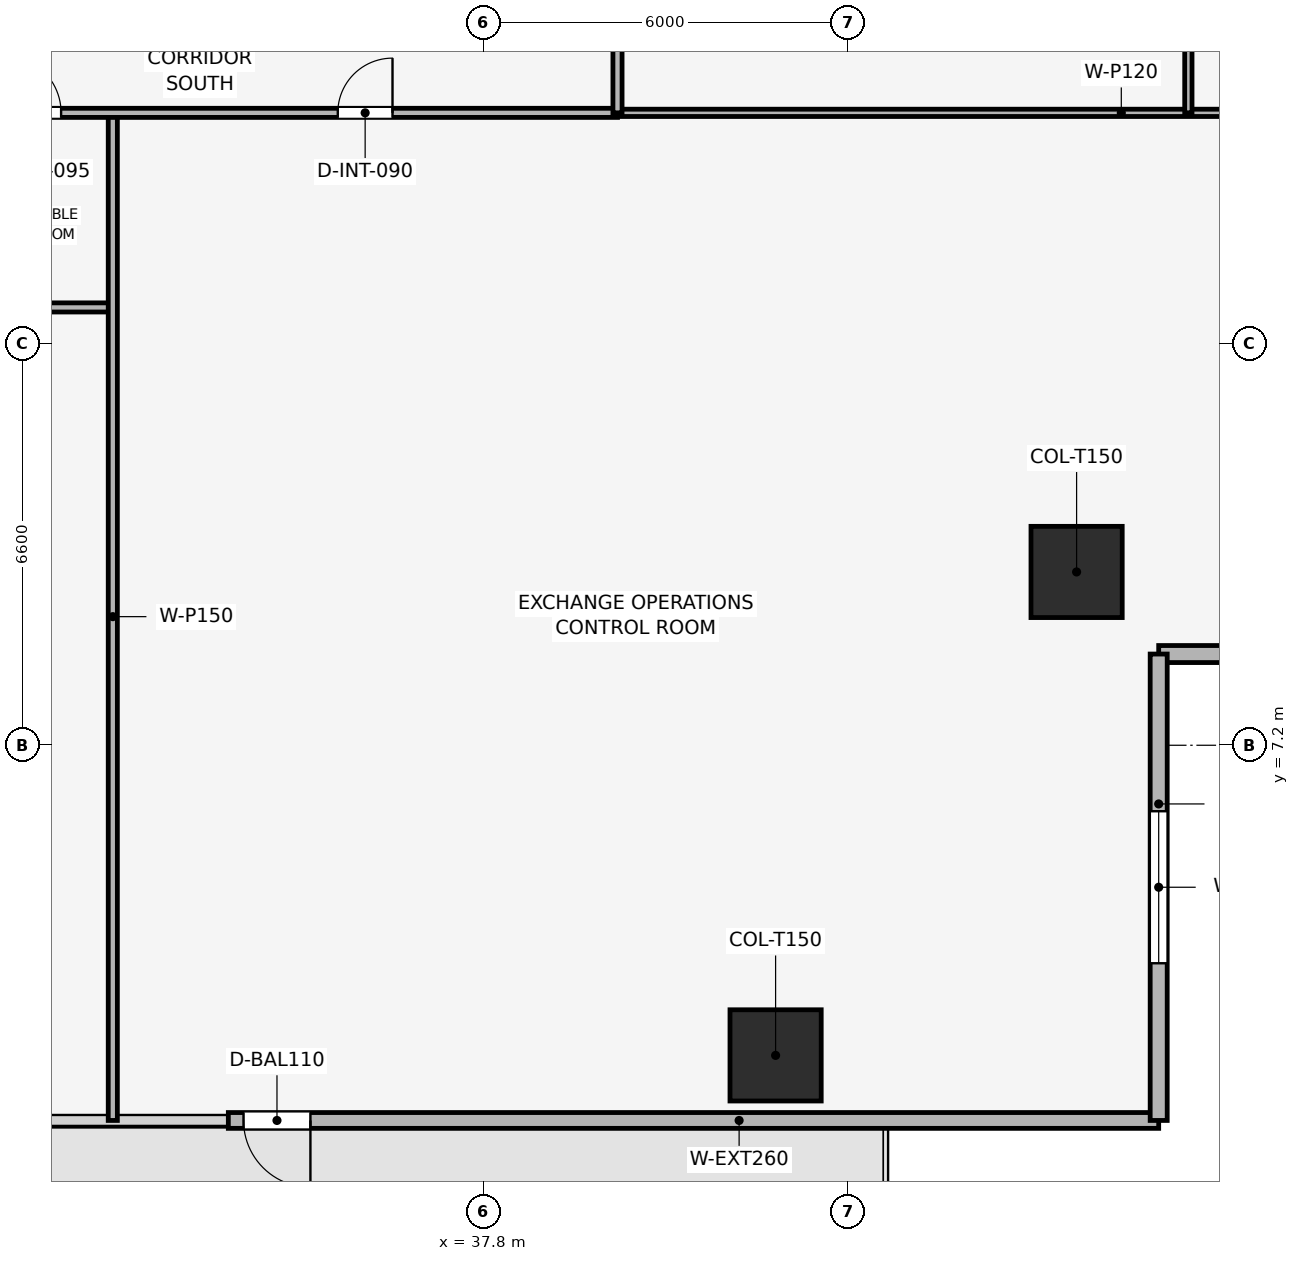
"""IFC4 building model, lengths in metres.
Left out: names, types, materials, properties, quantities, classifications, styles, units other than length and angle.
Written with IfcOpenShell. Run it as: python <this file> out.ifc"""

import sys

from ifc_helpers import new_model, si_unit, direction, frame, frame_2d, origin, origin_2d, place, context, subcontext, project, spatial, rectangle, extrude, element, fill, save


model = new_model("IFC4")
c1 = context("Model", 3, precision=1e-05, world=origin(), true_north=direction((0.0, 1.0)))
c2 = subcontext(c1, "Body", "Model", "MODEL_VIEW")
j1 = project(units=[si_unit("LENGTHUNIT", "METRE"), si_unit("PLANEANGLEUNIT", "RADIAN")], contexts=[c1])
p1 = place(None, origin())
s1 = spatial("IfcSite", under=j1, at=p1, CompositionType="ELEMENT")
p2 = place(p1, origin())
s2 = spatial("IfcBuilding", under=s1, at=p2, CompositionType="ELEMENT")
p3 = place(p2, frame((0.0, 0.0, 80.7)))
s3 = spatial("IfcBuildingStorey", under=s2, at=p3, CompositionType="ELEMENT", Elevation=80.7)
for number, where, z_axis, x_axis in (
    (1, (42.6, 2.1, 0.003), (0.0, 0.0, 1.0), (1.0, 0.0, 0.0)),
    (2, (47.55, 10.05, 0.003), (0.0, 0.0, 1.0), (1.0, 0.0, 0.0)),
):
    element("IfcColumn", number, at=place(p3, frame(where, z_axis=z_axis, x_axis=x_axis)), inside=s3, PredefinedType="COLUMN", context=c2, shape_type="SweptSolid", body=[
        extrude(rectangle(XDim=1.5, YDim=1.5, at=origin_2d()), origin(), (0.0, 0.0, 1.0), 3.644),
    ])
p4 = place(p3, frame((48.9, 1.03, 0.0), z_axis=(0.0, 0.0, 1.0), x_axis=(-1.0, 0.0, 0.0)))
e3 = element("IfcWall", 3, at=p4, inside=s3, PredefinedType="SOLIDWALL", context=c2, shape_type="SweptSolid", body=[
    extrude(rectangle(XDim=15.3, YDim=0.26, at=frame_2d((7.65, 0.0))), origin(), (0.0, 0.0, 1.0), 3.65),
])
p5 = place(p4, frame((13.95, 0.0, 0.0)))
e4 = element("IfcOpeningElement", 4, at=p5, cuts=e3, PredefinedType="OPENING", context=c2, shape_type="SweptSolid", body=[
    extrude(rectangle(XDim=1.1, YDim=2.2, at=frame_2d((0.55, 1.1))), frame((0.0, 0.14, 0.0), z_axis=(0.0, -1.0, 0.0), x_axis=(1.0, 0.0, 0.0)), (0.0, 0.0, 1.0), 0.28),
])
p6 = place(p3, frame((56.57, 8.7, 0.0), z_axis=(0.0, 0.0, 1.0), x_axis=(-1.0, 0.0, 0.0)))
e5 = element("IfcWall", 5, at=p6, inside=s3, PredefinedType="SOLIDWALL", context=c2, shape_type="SweptSolid", body=[
    extrude(rectangle(XDim=7.67, YDim=0.28, at=frame_2d((3.835, 0.0))), origin(), (0.0, 0.0, 1.0), 3.65),
])
p7 = place(p6, frame((2.585, 0.0, 0.9)))
e6 = element("IfcOpeningElement", 6, at=p7, cuts=e5, PredefinedType="OPENING", context=c2, shape_type="SweptSolid", body=[
    extrude(rectangle(XDim=2.5, YDim=1.9, at=frame_2d((1.25, 0.95))), frame((0.0, 0.15, 0.0), z_axis=(0.0, -1.0, 0.0), x_axis=(1.0, 0.0, 0.0)), (0.0, 0.0, 1.0), 0.3),
])
p8 = place(p3, frame((48.9, 8.7, 0.0), z_axis=(0.0, 0.0, 1.0), x_axis=(0.0, -1.0, 0.0)))
e7 = element("IfcWall", 7, at=p8, inside=s3, PredefinedType="SOLIDWALL", context=c2, shape_type="SweptSolid", body=[
    extrude(rectangle(XDim=7.67, YDim=0.28, at=frame_2d((3.835, 0.0))), origin(), (0.0, 0.0, 1.0), 3.65),
])
p9 = place(p8, frame((2.585, 0.0, 0.9)))
e8 = element("IfcOpeningElement", 8, at=p9, cuts=e7, PredefinedType="OPENING", context=c2, shape_type="SweptSolid", body=[
    extrude(rectangle(XDim=2.5, YDim=1.9, at=frame_2d((1.25, 0.95))), frame((0.0, 0.15, 0.0), z_axis=(0.0, -1.0, 0.0), x_axis=(1.0, 0.0, 0.0)), (0.0, 0.0, 1.0), 0.3),
])
p10 = place(p3, frame((23.3, 14.4, 0.0), z_axis=(0.0, 0.0, 1.0), x_axis=(1.0, 0.0, 0.0)))
e9 = element("IfcWall", 9, at=p10, inside=s3, PredefinedType="PARTITIONING", context=c2, shape_type="SweptSolid", body=[
    extrude(rectangle(XDim=8.4, YDim=0.15, at=frame_2d((4.2, 0.0))), origin(), (0.0, 0.0, 1.0), 3.085),
])
p11 = place(p3, frame((31.7, 1.03, 0.0), z_axis=(0.0, 0.0, 1.0), x_axis=(0.0, 1.0, 0.0)))
e10 = element("IfcWall", 10, at=p11, inside=s3, PredefinedType="PARTITIONING", context=c2, shape_type="SweptSolid", body=[
    extrude(rectangle(XDim=16.57, YDim=0.15, at=frame_2d((8.285, 0.0))), origin(), (0.0, 0.0, 1.0), 2.935),
])
p12 = place(p3, frame((40.0, 17.6, 0.0), z_axis=(0.0, 0.0, 1.0), x_axis=(1.0, 0.0, 0.0)))
e11 = element("IfcWall", 11, at=p12, inside=s3, PredefinedType="PARTITIONING", context=c2, shape_type="SweptSolid", body=[
    extrude(rectangle(XDim=16.57, YDim=0.12, at=frame_2d((8.285, 0.0))), origin(), (0.0, 0.0, 1.0), 2.935),
])
p13 = place(p3, frame((49.388, 17.6, 0.0), z_axis=(0.0, 0.0, 1.0), x_axis=(0.0, 1.0, 0.0)))
e12 = element("IfcWall", 12, at=p13, inside=s3, PredefinedType="PARTITIONING", context=c2, shape_type="SweptSolid", body=[
    extrude(rectangle(XDim=22.4, YDim=0.12, at=frame_2d((11.2, 0.0))), origin(), (0.0, 0.0, 1.0), 3.085),
])
p14 = place(p13, frame((17.783, 0.0, 0.0)))
e13 = element("IfcOpeningElement", 13, at=p14, cuts=e12, PredefinedType="OPENING", context=c2, shape_type="SweptSolid", body=[
    extrude(rectangle(XDim=0.9, YDim=2.1, at=frame_2d((0.45, 1.05))), frame((0.0, 0.07, 0.0), z_axis=(0.0, -1.0, 0.0), x_axis=(1.0, 0.0, 0.0)), (0.0, 0.0, 1.0), 0.14),
])
p15 = place(p3, frame((17.6, 17.6, 0.0), z_axis=(0.0, 0.0, 1.0), x_axis=(1.0, 0.0, 0.0)))
e14 = element("IfcWall", 14, at=p15, inside=s3, PredefinedType="PARTITIONING", context=c2, shape_type="SweptSolid", body=[
    extrude(rectangle(XDim=22.4, YDim=0.15, at=frame_2d((11.2, 0.0))), origin(), (0.0, 0.0, 1.0), 3.085),
])
p16 = place(p15, frame((2.4, 0.0, 0.0)))
e15 = element("IfcOpeningElement", 15, at=p16, cuts=e14, PredefinedType="OPENING", context=c2, shape_type="SweptSolid", body=[
    extrude(rectangle(XDim=0.9, YDim=2.1, at=frame_2d((0.45, 1.05))), frame((0.0, 0.085, 0.0), z_axis=(0.0, -1.0, 0.0), x_axis=(1.0, 0.0, 0.0)), (0.0, 0.0, 1.0), 0.17),
])
p17 = place(p15, frame((6.65, 0.0, 0.0)))
e16 = element("IfcOpeningElement", 16, at=p17, cuts=e14, PredefinedType="OPENING", context=c2, shape_type="SweptSolid", body=[
    extrude(rectangle(XDim=0.9, YDim=2.1, at=frame_2d((0.45, 1.05))), frame((0.0, 0.085, 0.0), z_axis=(0.0, -1.0, 0.0), x_axis=(1.0, 0.0, 0.0)), (0.0, 0.0, 1.0), 0.17),
])
p18 = place(p15, frame((9.55, 0.0, 0.0)))
e17 = element("IfcOpeningElement", 17, at=p18, cuts=e14, PredefinedType="OPENING", context=c2, shape_type="SweptSolid", body=[
    extrude(rectangle(XDim=0.9, YDim=2.1, at=frame_2d((0.45, 1.05))), frame((0.0, 0.085, 0.0), z_axis=(0.0, -1.0, 0.0), x_axis=(1.0, 0.0, 0.0)), (0.0, 0.0, 1.0), 0.17),
])
p19 = place(p15, frame((12.3, 0.0, 0.0)))
e18 = element("IfcOpeningElement", 18, at=p19, cuts=e14, PredefinedType="OPENING", context=c2, shape_type="SweptSolid", body=[
    extrude(rectangle(XDim=0.95, YDim=2.1, at=frame_2d((0.475, 1.05))), frame((0.0, 0.085, 0.0), z_axis=(0.0, -1.0, 0.0), x_axis=(1.0, 0.0, 0.0)), (0.0, 0.0, 1.0), 0.17),
])
p20 = place(p15, frame((17.8, 0.0, 0.0)))
e19 = element("IfcOpeningElement", 19, at=p20, cuts=e14, PredefinedType="OPENING", context=c2, shape_type="SweptSolid", body=[
    extrude(rectangle(XDim=0.9, YDim=2.1, at=frame_2d((0.45, 1.05))), frame((0.0, 0.085, 0.0), z_axis=(0.0, -1.0, 0.0), x_axis=(1.0, 0.0, 0.0)), (0.0, 0.0, 1.0), 0.17),
])
p21 = place(p3, frame((40.0, 17.6, 0.0), z_axis=(0.0, 0.0, 1.0), x_axis=(0.0, 1.0, 0.0)))
e20 = element("IfcWall", 20, at=p21, inside=s3, PredefinedType="PARTITIONING", context=c2, shape_type="SweptSolid", body=[
    extrude(rectangle(XDim=22.4, YDim=0.15, at=frame_2d((11.2, 0.0))), origin(), (0.0, 0.0, 1.0), 3.085),
])
p22 = place(p21, frame((10.75, 0.0, 0.0)))
e21 = element("IfcOpeningElement", 21, at=p22, cuts=e20, PredefinedType="OPENING", context=c2, shape_type="SweptSolid", body=[
    extrude(rectangle(XDim=0.9, YDim=2.1, at=frame_2d((0.45, 1.05))), frame((0.0, 0.085, 0.0), z_axis=(0.0, -1.0, 0.0), x_axis=(1.0, 0.0, 0.0)), (0.0, 0.0, 1.0), 0.17),
])
p23 = place(p5, origin())
e22 = element("IfcDoor", 22, at=p23, inside=s3, OperationType="SINGLE_SWING_LEFT", PredefinedType="DOOR", context=c2, shape_type="SweptSolid", body=[
    extrude(rectangle(XDim=1.1, YDim=2.2, at=frame_2d((0.55, 1.1))), frame((0.0, 0.025, 0.0), z_axis=(0.0, -1.0, 0.0), x_axis=(1.0, 0.0, 0.0)), (0.0, 0.0, 1.0), 0.05),
])
fill(e4, e22)
p24 = place(p9, origin())
e23 = element("IfcWindow", 23, at=p24, inside=s3, PartitioningType="SINGLE_PANEL", PredefinedType="WINDOW", context=c2, shape_type="SweptSolid", body=[
    extrude(rectangle(XDim=2.5, YDim=1.9, at=frame_2d((1.25, 0.95))), frame((0.0, 0.03, 0.0), z_axis=(0.0, -1.0, 0.0), x_axis=(1.0, 0.0, 0.0)), (0.0, 0.0, 1.0), 0.06),
])
fill(e8, e23)
p25 = place(p19, origin())
e24 = element("IfcDoor", 24, at=p25, inside=s3, OperationType="SINGLE_SWING_LEFT", PredefinedType="DOOR", context=c2, shape_type="SweptSolid", body=[
    extrude(rectangle(XDim=0.95, YDim=2.1, at=frame_2d((0.475, 1.05))), frame((0.0, 0.025, 0.0), z_axis=(0.0, -1.0, 0.0), x_axis=(1.0, 0.0, 0.0)), (0.0, 0.0, 1.0), 0.05),
])
fill(e18, e24)
p26 = place(p20, origin())
e25 = element("IfcDoor", 25, at=p26, inside=s3, OperationType="SINGLE_SWING_RIGHT", PredefinedType="DOOR", context=c2, shape_type="SweptSolid", body=[
    extrude(rectangle(XDim=0.9, YDim=2.1, at=frame_2d((0.45, 1.05))), frame((0.0, 0.025, 0.0), z_axis=(0.0, -1.0, 0.0), x_axis=(1.0, 0.0, 0.0)), (0.0, 0.0, 1.0), 0.05),
])
fill(e19, e25)
save(model, sys.argv[1])
